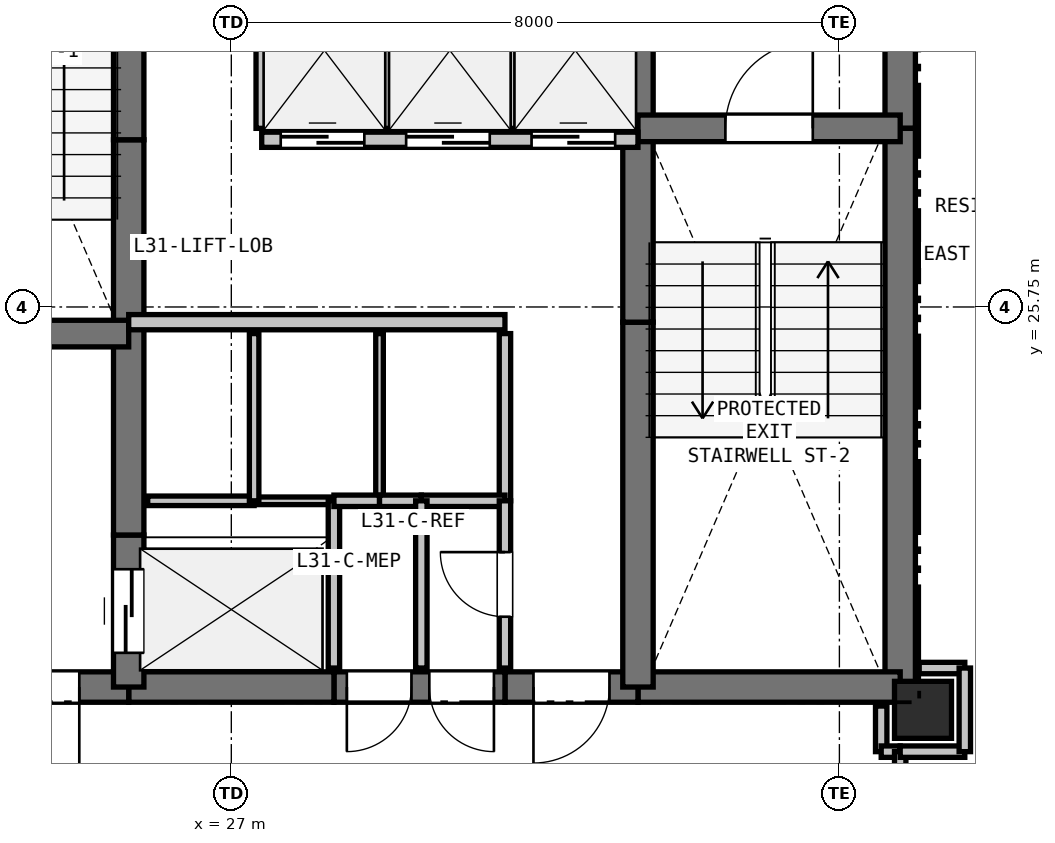
"""IFC4 building model, lengths in metres.
Left out: names, types, materials, properties, quantities, classifications, styles, units other than length and angle.
Written with IfcOpenShell. Run it as: python <this file> out.ifc"""

import sys

from ifc_helpers import new_model, si_unit, direction, frame, frame_2d, origin, origin_2d, place, context, subcontext, project, spatial, rectangle, extrude, element, fill, save


model = new_model("IFC4")
c1 = context("Model", 3, precision=1e-05, world=origin(), true_north=direction((0.0, 1.0)))
c2 = subcontext(c1, "Body", "Model", "MODEL_VIEW")
j1 = project(units=[si_unit("LENGTHUNIT", "METRE"), si_unit("PLANEANGLEUNIT", "RADIAN")], contexts=[c1])
p1 = place(None, origin())
s1 = spatial("IfcSite", under=j1, at=p1, CompositionType="ELEMENT")
p2 = place(p1, origin())
s2 = spatial("IfcBuilding", under=s1, at=p2, CompositionType="ELEMENT")
p3 = place(p2, frame((0.0, 0.0, 113.1)))
s3 = spatial("IfcBuildingStorey", under=s2, at=p3, CompositionType="ELEMENT", Elevation=113.1)
p4 = place(p3, frame((36.1, 20.45, 0.0), z_axis=(0.0, 0.0, 1.0), x_axis=(1.0, 0.0, 0.0)))
e1 = element("IfcColumn", 1, at=p4, inside=s3, PredefinedType="COLUMN", context=c2, shape_type="SweptSolid", body=[
    extrude(rectangle(XDim=0.75, YDim=0.75, at=origin_2d()), origin(), (0.0, 0.0, 1.0), 3.3),
])
p5 = place(p3, frame((35.8, 32.75, 0.0), z_axis=(0.0, 0.0, 1.0), x_axis=(0.0, -1.0, 0.0)))
e2 = element("IfcWall", 2, at=p5, inside=s3, PredefinedType="SHEAR", context=c2, shape_type="SweptSolid", body=[
    extrude(rectangle(XDim=4.65, YDim=0.4, at=frame_2d((2.325, 0.0))), origin(), (0.0, 0.0, 1.0), 3.02),
])
p6 = place(p3, frame((35.8, 28.1, 0.0), z_axis=(0.0, 0.0, 1.0), x_axis=(0.0, -1.0, 0.0)))
e3 = element("IfcWall", 3, at=p6, inside=s3, PredefinedType="SHEAR", context=c2, shape_type="SweptSolid", body=[
    extrude(rectangle(XDim=7.35, YDim=0.4, at=frame_2d((3.675, 0.0))), origin(), (0.0, 0.0, 1.0), 3.02),
])
p7 = place(p3, frame((35.8, 20.75, 0.0), z_axis=(0.0, 0.0, 1.0), x_axis=(-1.0, 0.0, 0.0)))
e4 = element("IfcWall", 4, at=p7, inside=s3, PredefinedType="SHEAR", context=c2, shape_type="SweptSolid", body=[
    extrude(rectangle(XDim=3.45, YDim=0.4, at=frame_2d((1.725, 0.0))), origin(), (0.0, 0.0, 1.0), 3.02),
])
p8 = place(p3, frame((32.35, 20.75, 0.0), z_axis=(0.0, 0.0, 1.0), x_axis=(-1.0, 0.0, 0.0)))
e5 = element("IfcWall", 5, at=p8, inside=s3, PredefinedType="SHEAR", context=c2, shape_type="SweptSolid", body=[
    extrude(rectangle(XDim=1.75, YDim=0.4, at=frame_2d((0.875, 0.0))), origin(), (0.0, 0.0, 1.0), 3.02),
])
p9 = place(p8, frame((0.375, 0.0, 0.0)))
e6 = element("IfcOpeningElement", 6, at=p9, cuts=e5, PredefinedType="OPENING", context=c2, shape_type="SweptSolid", body=[
    extrude(rectangle(XDim=1.0, YDim=2.15, at=frame_2d((0.5, 1.075))), frame((0.0, 0.21, 0.0), z_axis=(0.0, -1.0, 0.0), x_axis=(1.0, 0.0, 0.0)), (0.0, 0.0, 1.0), 0.42),
])
p10 = place(p3, frame((30.6, 20.75, 0.0), z_axis=(0.0, 0.0, 1.0), x_axis=(-1.0, 0.0, 0.0)))
e7 = element("IfcWall", 7, at=p10, inside=s3, PredefinedType="SHEAR", context=c2, shape_type="SweptSolid", body=[
    extrude(rectangle(XDim=2.25, YDim=0.4, at=frame_2d((1.125, 0.0))), origin(), (0.0, 0.0, 1.0), 3.02),
])
p11 = place(p10, frame((1.23, 0.0, 0.0)))
e8 = element("IfcOpeningElement", 8, at=p11, cuts=e7, PredefinedType="OPENING", context=c2, shape_type="SweptSolid", body=[
    extrude(rectangle(XDim=0.85, YDim=2.1, at=frame_2d((0.425, 1.05))), frame((0.0, 0.21, 0.0), z_axis=(0.0, -1.0, 0.0), x_axis=(1.0, 0.0, 0.0)), (0.0, 0.0, 1.0), 0.42),
])
p12 = place(p10, frame((0.145, 0.0, 0.0)))
e9 = element("IfcOpeningElement", 9, at=p12, cuts=e7, PredefinedType="OPENING", context=c2, shape_type="SweptSolid", body=[
    extrude(rectangle(XDim=0.85, YDim=2.1, at=frame_2d((0.425, 1.05))), frame((0.0, 0.21, 0.0), z_axis=(0.0, -1.0, 0.0), x_axis=(1.0, 0.0, 0.0)), (0.0, 0.0, 1.0), 0.42),
])
p13 = place(p3, frame((28.35, 20.75, 0.0), z_axis=(0.0, 0.0, 1.0), x_axis=(-1.0, 0.0, 0.0)))
e10 = element("IfcWall", 10, at=p13, inside=s3, PredefinedType="SHEAR", context=c2, shape_type="SweptSolid", body=[
    extrude(rectangle(XDim=2.7, YDim=0.4, at=frame_2d((1.35, 0.0))), origin(), (0.0, 0.0, 1.0), 3.02),
])
p14 = place(p3, frame((25.65, 20.75, 0.0), z_axis=(0.0, 0.0, 1.0), x_axis=(-1.0, 0.0, 0.0)))
e11 = element("IfcWall", 11, at=p14, inside=s3, PredefinedType="SHEAR", context=c2, shape_type="SweptSolid", body=[
    extrude(rectangle(XDim=3.45, YDim=0.4, at=frame_2d((1.725, 0.0))), origin(), (0.0, 0.0, 1.0), 3.02),
])
p15 = place(p14, frame((0.65, 0.0, 0.0)))
e12 = element("IfcOpeningElement", 12, at=p15, cuts=e11, PredefinedType="OPENING", context=c2, shape_type="SweptSolid", body=[
    extrude(rectangle(XDim=1.15, YDim=2.15, at=frame_2d((0.575, 1.075))), frame((0.0, 0.21, 0.0), z_axis=(0.0, -1.0, 0.0), x_axis=(1.0, 0.0, 0.0)), (0.0, 0.0, 1.0), 0.42),
])
p16 = place(p3, frame((25.65, 20.75, 0.0), z_axis=(0.0, 0.0, 1.0), x_axis=(0.0, 1.0, 0.0)))
e13 = element("IfcWall", 13, at=p16, inside=s3, PredefinedType="SHEAR", context=c2, shape_type="SweptSolid", body=[
    extrude(rectangle(XDim=2.0, YDim=0.4, at=frame_2d((1.0, 0.0))), origin(), (0.0, 0.0, 1.0), 3.02),
])
p17 = place(p16, frame((0.45, 0.0, 0.0)))
e14 = element("IfcOpeningElement", 14, at=p17, cuts=e13, PredefinedType="OPENING", context=c2, shape_type="SweptSolid", body=[
    extrude(rectangle(XDim=1.1, YDim=2.15, at=frame_2d((0.55, 1.075))), frame((0.0, 0.21, 0.0), z_axis=(0.0, -1.0, 0.0), x_axis=(1.0, 0.0, 0.0)), (0.0, 0.0, 1.0), 0.42),
])
p18 = place(p3, frame((25.65, 22.75, 0.0), z_axis=(0.0, 0.0, 1.0), x_axis=(0.0, 1.0, 0.0)))
e15 = element("IfcWall", 15, at=p18, inside=s3, PredefinedType="SHEAR", context=c2, shape_type="SweptSolid", body=[
    extrude(rectangle(XDim=2.8, YDim=0.4, at=frame_2d((1.4, 0.0))), origin(), (0.0, 0.0, 1.0), 3.02),
])
p19 = place(p3, frame((25.65, 25.55, 0.0), z_axis=(0.0, 0.0, 1.0), x_axis=(0.0, 1.0, 0.0)))
e16 = element("IfcWall", 16, at=p19, inside=s3, PredefinedType="SHEAR", context=c2, shape_type="SweptSolid", body=[
    extrude(rectangle(XDim=2.4, YDim=0.4, at=frame_2d((1.2, 0.0))), origin(), (0.0, 0.0, 1.0), 3.02),
])
for number, where, z_axis, x_axis in (
    (17, (25.65, 27.95, 0.0), (0.0, 0.0, 1.0), (0.0, 1.0, 0.0)),
    (18, (32.35, 20.75, 0.0), (0.0, 0.0, 1.0), (0.0, 1.0, 0.0)),
):
    element("IfcWall", number, at=place(p3, frame(where, z_axis=z_axis, x_axis=x_axis)), inside=s3, PredefinedType="SHEAR", context=c2, shape_type="SweptSolid", body=[
        extrude(rectangle(XDim=4.8, YDim=0.4, at=frame_2d((2.4, 0.0))), origin(), (0.0, 0.0, 1.0), 3.02),
    ])
p20 = place(p3, frame((32.35, 25.55, 0.0), z_axis=(0.0, 0.0, 1.0), x_axis=(0.0, 1.0, 0.0)))
e19 = element("IfcWall", 19, at=p20, inside=s3, PredefinedType="SHEAR", context=c2, shape_type="SweptSolid", body=[
    extrude(rectangle(XDim=2.4, YDim=0.4, at=frame_2d((1.2, 0.0))), origin(), (0.0, 0.0, 1.0), 3.02),
])
p21 = place(p3, frame((32.35, 27.95, 0.0), z_axis=(0.0, 0.0, 1.0), x_axis=(0.0, 1.0, 0.0)))
e20 = element("IfcWall", 20, at=p21, inside=s3, PredefinedType="SHEAR", context=c2, shape_type="SweptSolid", body=[
    extrude(rectangle(XDim=2.8, YDim=0.4, at=frame_2d((1.4, 0.0))), origin(), (0.0, 0.0, 1.0), 3.02),
])
p22 = place(p3, frame((22.2, 25.4, 0.0), z_axis=(0.0, 0.0, 1.0), x_axis=(1.0, 0.0, 0.0)))
e21 = element("IfcWall", 21, at=p22, inside=s3, PredefinedType="SHEAR", context=c2, shape_type="SweptSolid", body=[
    extrude(rectangle(XDim=3.45, YDim=0.35, at=frame_2d((1.725, 0.0))), origin(), (0.0, 0.0, 1.0), 3.02),
])
p23 = place(p22, frame((1.15, 0.0, 0.0)))
e22 = element("IfcOpeningElement", 22, at=p23, cuts=e21, PredefinedType="OPENING", context=c2, shape_type="SweptSolid", body=[
    extrude(rectangle(XDim=1.15, YDim=2.15, at=frame_2d((0.575, 1.075))), frame((0.0, 0.185, 0.0), z_axis=(0.0, -1.0, 0.0), x_axis=(1.0, 0.0, 0.0)), (0.0, 0.0, 1.0), 0.37),
])
p24 = place(p3, frame((32.35, 28.1, 0.0), z_axis=(0.0, 0.0, 1.0), x_axis=(1.0, 0.0, 0.0)))
e23 = element("IfcWall", 23, at=p24, inside=s3, PredefinedType="SHEAR", context=c2, shape_type="SweptSolid", body=[
    extrude(rectangle(XDim=3.45, YDim=0.35, at=frame_2d((1.725, 0.0))), origin(), (0.0, 0.0, 1.0), 3.02),
])
p25 = place(p24, frame((1.15, 0.0, 0.0)))
e24 = element("IfcOpeningElement", 24, at=p25, cuts=e23, PredefinedType="OPENING", context=c2, shape_type="SweptSolid", body=[
    extrude(rectangle(XDim=1.15, YDim=2.15, at=frame_2d((0.575, 1.075))), frame((0.0, 0.185, 0.0), z_axis=(0.0, -1.0, 0.0), x_axis=(1.0, 0.0, 0.0)), (0.0, 0.0, 1.0), 0.37),
])
p26 = place(p3, frame((25.65, 25.55, 0.0), z_axis=(0.0, 0.0, 1.0), x_axis=(1.0, 0.0, 0.0)))
e25 = element("IfcWall", 25, at=p26, inside=s3, PredefinedType="PARTITIONING", context=c2, shape_type="SweptSolid", body=[
    extrude(rectangle(XDim=4.95, YDim=0.2, at=frame_2d((2.475, 0.0))), origin(), (0.0, 0.0, 1.0), 3.02),
])
p27 = place(p3, frame((27.4, 27.95, 0.0), z_axis=(0.0, 0.0, 1.0), x_axis=(1.0, 0.0, 0.0)))
e26 = element("IfcWall", 26, at=p27, inside=s3, PredefinedType="PARTITIONING", context=c2, shape_type="SweptSolid", body=[
    extrude(rectangle(XDim=4.95, YDim=0.2, at=frame_2d((2.475, 0.0))), origin(), (0.0, 0.0, 1.0), 3.02),
])
p28 = place(p27, frame((0.25, 0.0, 0.0)))
e27 = element("IfcOpeningElement", 27, at=p28, cuts=e26, PredefinedType="OPENING", context=c2, shape_type="SweptSolid", body=[
    extrude(rectangle(XDim=1.1, YDim=2.15, at=frame_2d((0.55, 1.075))), frame((0.0, 0.11, 0.0), z_axis=(0.0, -1.0, 0.0), x_axis=(1.0, 0.0, 0.0)), (0.0, 0.0, 1.0), 0.22),
])
p29 = place(p27, frame((1.9, 0.0, 0.0)))
e28 = element("IfcOpeningElement", 28, at=p29, cuts=e26, PredefinedType="OPENING", context=c2, shape_type="SweptSolid", body=[
    extrude(rectangle(XDim=1.1, YDim=2.15, at=frame_2d((0.55, 1.075))), frame((0.0, 0.11, 0.0), z_axis=(0.0, -1.0, 0.0), x_axis=(1.0, 0.0, 0.0)), (0.0, 0.0, 1.0), 0.22),
])
p30 = place(p27, frame((3.55, 0.0, 0.0)))
e29 = element("IfcOpeningElement", 29, at=p30, cuts=e26, PredefinedType="OPENING", context=c2, shape_type="SweptSolid", body=[
    extrude(rectangle(XDim=1.1, YDim=2.15, at=frame_2d((0.55, 1.075))), frame((0.0, 0.11, 0.0), z_axis=(0.0, -1.0, 0.0), x_axis=(1.0, 0.0, 0.0)), (0.0, 0.0, 1.0), 0.22),
])
p31 = place(p3, frame((25.9, 23.2, 0.0), z_axis=(0.0, 0.0, 1.0), x_axis=(1.0, 0.0, 0.0)))
e30 = element("IfcWall", 30, at=p31, inside=s3, PredefinedType="PARTITIONING", context=c2, shape_type="SweptSolid", body=[
    extrude(rectangle(XDim=1.4, YDim=0.125, at=frame_2d((0.7, 0.0))), origin(), (0.0, 0.0, 1.0), 3.02),
])
p32 = place(p3, frame((27.3, 23.2, 0.0), z_axis=(0.0, 0.0, 1.0), x_axis=(1.0, 0.0, 0.0)))
e31 = element("IfcWall", 31, at=p32, inside=s3, PredefinedType="PARTITIONING", context=c2, shape_type="SweptSolid", body=[
    extrude(rectangle(XDim=1.05, YDim=0.1, at=frame_2d((0.525, 0.0))), origin(), (0.0, 0.0, 1.0), 3.02),
])
p33 = place(p3, frame((28.35, 23.2, 0.0), z_axis=(0.0, 0.0, 1.0), x_axis=(0.0, -1.0, 0.0)))
e32 = element("IfcWall", 32, at=p33, inside=s3, PredefinedType="PARTITIONING", context=c2, shape_type="SweptSolid", body=[
    extrude(rectangle(XDim=2.2, YDim=0.15, at=frame_2d((1.1, 0.0))), origin(), (0.0, 0.0, 1.0), 3.02),
])
p34 = place(p3, frame((27.3, 25.4, 0.0), z_axis=(0.0, 0.0, 1.0), x_axis=(0.0, -1.0, 0.0)))
e33 = element("IfcWall", 33, at=p34, inside=s3, PredefinedType="PARTITIONING", context=c2, shape_type="SweptSolid", body=[
    extrude(rectangle(XDim=2.2, YDim=0.125, at=frame_2d((1.1, 0.0))), origin(), (0.0, 0.0, 1.0), 3.02),
])
p35 = place(p3, frame((28.95, 25.4, 0.0), z_axis=(0.0, 0.0, 1.0), x_axis=(0.0, -1.0, 0.0)))
e34 = element("IfcWall", 34, at=p35, inside=s3, PredefinedType="PARTITIONING", context=c2, shape_type="SweptSolid", body=[
    extrude(rectangle(XDim=2.2, YDim=0.1, at=frame_2d((1.1, 0.0))), origin(), (0.0, 0.0, 1.0), 3.02),
])
p36 = place(p3, frame((28.95, 23.2, 0.0), z_axis=(0.0, 0.0, 1.0), x_axis=(-1.0, 0.0, 0.0)))
e35 = element("IfcWall", 35, at=p36, inside=s3, PredefinedType="PARTITIONING", context=c2, shape_type="SweptSolid", body=[
    extrude(rectangle(XDim=0.6, YDim=0.15, at=frame_2d((0.3, 0.0))), origin(), (0.0, 0.0, 1.0), 3.02),
])
p37 = place(p3, frame((30.6, 25.4, 0.0), z_axis=(0.0, 0.0, 1.0), x_axis=(0.0, -1.0, 0.0)))
e36 = element("IfcWall", 36, at=p37, inside=s3, PredefinedType="PARTITIONING", context=c2, shape_type="SweptSolid", body=[
    extrude(rectangle(XDim=2.2, YDim=0.15, at=frame_2d((1.1, 0.0))), origin(), (0.0, 0.0, 1.0), 3.02),
])
p38 = place(p3, frame((30.6, 23.2, 0.0), z_axis=(0.0, 0.0, 1.0), x_axis=(-1.0, 0.0, 0.0)))
e37 = element("IfcWall", 37, at=p38, inside=s3, PredefinedType="PARTITIONING", context=c2, shape_type="SweptSolid", body=[
    extrude(rectangle(XDim=1.1, YDim=0.15, at=frame_2d((0.55, 0.0))), origin(), (0.0, 0.0, 1.0), 3.02),
])
p39 = place(p3, frame((29.5, 23.2, 0.0), z_axis=(0.0, 0.0, 1.0), x_axis=(-1.0, 0.0, 0.0)))
e38 = element("IfcWall", 38, at=p39, inside=s3, PredefinedType="PARTITIONING", context=c2, shape_type="SweptSolid", body=[
    extrude(rectangle(XDim=0.55, YDim=0.15, at=frame_2d((0.275, 0.0))), origin(), (0.0, 0.0, 1.0), 3.02),
])
p40 = place(p3, frame((29.05, 30.3, 0.0), z_axis=(0.0, 0.0, 1.0), x_axis=(0.0, -1.0, 0.0)))
e39 = element("IfcWall", 39, at=p40, inside=s3, PredefinedType="PARTITIONING", context=c2, shape_type="SweptSolid", body=[
    extrude(rectangle(XDim=2.2, YDim=0.125, at=frame_2d((1.1, 0.0))), origin(), (0.0, 0.0, 1.0), 3.02),
])
p41 = place(p3, frame((27.4, 28.1, 0.0), z_axis=(0.0, 0.0, 1.0), x_axis=(0.0, 1.0, 0.0)))
e40 = element("IfcWall", 40, at=p41, inside=s3, PredefinedType="PARTITIONING", context=c2, shape_type="SweptSolid", body=[
    extrude(rectangle(XDim=2.2, YDim=0.15, at=frame_2d((1.1, 0.0))), origin(), (0.0, 0.0, 1.0), 3.02),
])
p42 = place(p3, frame((30.7, 30.3, 0.0), z_axis=(0.0, 0.0, 1.0), x_axis=(0.0, -1.0, 0.0)))
e41 = element("IfcWall", 41, at=p42, inside=s3, PredefinedType="PARTITIONING", context=c2, shape_type="SweptSolid", body=[
    extrude(rectangle(XDim=2.2, YDim=0.1, at=frame_2d((1.1, 0.0))), origin(), (0.0, 0.0, 1.0), 3.02),
])
p43 = place(p3, frame((30.6, 21.0, 0.0), z_axis=(0.0, 0.0, 1.0), x_axis=(0.0, 1.0, 0.0)))
e42 = element("IfcWall", 42, at=p43, inside=s3, PredefinedType="PARTITIONING", context=c2, shape_type="SweptSolid", body=[
    extrude(rectangle(XDim=2.2, YDim=0.15, at=frame_2d((1.1, 0.0))), origin(), (0.0, 0.0, 1.0), 3.02),
])
p44 = place(p43, frame((0.675, 0.0, 0.0)))
e43 = element("IfcOpeningElement", 43, at=p44, cuts=e42, PredefinedType="OPENING", context=c2, shape_type="SweptSolid", body=[
    extrude(rectangle(XDim=0.85, YDim=2.1, at=frame_2d((0.425, 1.05))), frame((0.0, 0.085, 0.0), z_axis=(0.0, -1.0, 0.0), x_axis=(1.0, 0.0, 0.0)), (0.0, 0.0, 1.0), 0.17),
])
p45 = place(p3, frame((35.55, 20.5, 0.0), z_axis=(0.0, 0.0, 1.0), x_axis=(0.0, -1.0, 0.0)))
e44 = element("IfcWall", 44, at=p45, inside=s3, PredefinedType="PARTITIONING", context=c2, shape_type="SweptSolid", body=[
    extrude(rectangle(XDim=0.6, YDim=0.15, at=frame_2d((0.3, 0.0))), origin(), (0.0, 0.0, 1.0), 2.468),
])
p46 = place(p3, frame((35.55, 19.9, 0.0), z_axis=(0.0, 0.0, 1.0), x_axis=(1.0, 0.0, 0.0)))
e45 = element("IfcWall", 45, at=p46, inside=s3, PredefinedType="PARTITIONING", context=c2, shape_type="SweptSolid", body=[
    extrude(rectangle(XDim=0.25, YDim=0.15, at=frame_2d((0.125, 0.0))), origin(), (0.0, 0.0, 1.0), 3.02),
])
p47 = place(p3, frame((35.8, 19.9, 0.0), z_axis=(0.0, 0.0, 1.0), x_axis=(0.0, -1.0, 0.0)))
e46 = element("IfcWall", 46, at=p47, inside=s3, PredefinedType="PARTITIONING", context=c2, shape_type="SweptSolid", body=[
    extrude(rectangle(XDim=1.75, YDim=0.15, at=frame_2d((0.875, 0.0))), origin(), (0.0, 0.0, 1.0), 3.02),
])
p48 = place(p47, frame((0.375, 0.0, 0.0)))
e47 = element("IfcOpeningElement", 47, at=p48, cuts=e46, PredefinedType="OPENING", context=c2, shape_type="SweptSolid", body=[
    extrude(rectangle(XDim=1.0, YDim=2.15, at=frame_2d((0.5, 1.075))), frame((0.0, 0.085, 0.0), z_axis=(0.0, -1.0, 0.0), x_axis=(1.0, 0.0, 0.0)), (0.0, 0.0, 1.0), 0.17),
])
p49 = place(p3, frame((36.65, 21.0, 0.0), z_axis=(0.0, 0.0, 1.0), x_axis=(-1.0, 0.0, 0.0)))
e48 = element("IfcWall", 48, at=p49, inside=s3, PredefinedType="PARTITIONING", context=c2, shape_type="SweptSolid", body=[
    extrude(rectangle(XDim=0.6, YDim=0.15, at=frame_2d((0.3, 0.0))), origin(), (0.0, 0.0, 1.0), 2.468),
])
p50 = place(p3, frame((35.8, 19.9, 0.0), z_axis=(0.0, 0.0, 1.0), x_axis=(1.0, 0.0, 0.0)))
e49 = element("IfcWall", 49, at=p50, inside=s3, PredefinedType="PARTITIONING", context=c2, shape_type="SweptSolid", body=[
    extrude(rectangle(XDim=0.85, YDim=0.15, at=frame_2d((0.425, 0.0))), origin(), (0.0, 0.0, 1.0), 2.393),
])
p51 = place(p3, frame((36.65, 19.9, 0.0), z_axis=(0.0, 0.0, 1.0), x_axis=(0.0, 1.0, 0.0)))
e50 = element("IfcWall", 50, at=p51, inside=s3, PredefinedType="PARTITIONING", context=c2, shape_type="SweptSolid", body=[
    extrude(rectangle(XDim=1.1, YDim=0.15, at=frame_2d((0.55, 0.0))), origin(), (0.0, 0.0, 1.0), 3.02),
])
p52 = place(p3, frame((29.5, 23.2, 0.0), z_axis=(0.0, 0.0, 1.0), x_axis=(0.0, -1.0, 0.0)))
e51 = element("IfcWall", 51, at=p52, inside=s3, PredefinedType="PARTITIONING", context=c2, shape_type="SweptSolid", body=[
    extrude(rectangle(XDim=2.2, YDim=0.15, at=frame_2d((1.1, 0.0))), origin(), (0.0, 0.0, 1.0), 3.02),
])
p53 = place(p28, origin())
e52 = element("IfcDoor", 52, at=p53, inside=s3, OperationType="SLIDING_TO_LEFT", PredefinedType="DOOR", context=c2, shape_type="SweptSolid", body=[
    extrude(rectangle(XDim=1.1, YDim=2.15, at=frame_2d((0.55, 1.075))), frame((0.0, 0.025, 0.0), z_axis=(0.0, -1.0, 0.0), x_axis=(1.0, 0.0, 0.0)), (0.0, 0.0, 1.0), 0.05),
])
fill(e27, e52)
p54 = place(p29, origin())
e53 = element("IfcDoor", 53, at=p54, inside=s3, OperationType="SLIDING_TO_LEFT", PredefinedType="DOOR", context=c2, shape_type="SweptSolid", body=[
    extrude(rectangle(XDim=1.1, YDim=2.15, at=frame_2d((0.55, 1.075))), frame((0.0, 0.025, 0.0), z_axis=(0.0, -1.0, 0.0), x_axis=(1.0, 0.0, 0.0)), (0.0, 0.0, 1.0), 0.05),
])
fill(e28, e53)
p55 = place(p30, origin())
e54 = element("IfcDoor", 54, at=p55, inside=s3, OperationType="SLIDING_TO_LEFT", PredefinedType="DOOR", context=c2, shape_type="SweptSolid", body=[
    extrude(rectangle(XDim=1.1, YDim=2.15, at=frame_2d((0.55, 1.075))), frame((0.0, 0.025, 0.0), z_axis=(0.0, -1.0, 0.0), x_axis=(1.0, 0.0, 0.0)), (0.0, 0.0, 1.0), 0.05),
])
fill(e29, e54)
p56 = place(p9, origin())
e55 = element("IfcDoor", 55, at=p56, inside=s3, OperationType="SINGLE_SWING_RIGHT", PredefinedType="DOOR", context=c2, shape_type="SweptSolid", body=[
    extrude(rectangle(XDim=1.0, YDim=2.15, at=frame_2d((0.5, 1.075))), frame((0.0, 0.025, 0.0), z_axis=(0.0, -1.0, 0.0), x_axis=(1.0, 0.0, 0.0)), (0.0, 0.0, 1.0), 0.05),
])
fill(e6, e55)
p57 = place(p17, origin())
e56 = element("IfcDoor", 56, at=p57, inside=s3, OperationType="SLIDING_TO_LEFT", PredefinedType="DOOR", context=c2, shape_type="SweptSolid", body=[
    extrude(rectangle(XDim=1.1, YDim=2.15, at=frame_2d((0.55, 1.075))), frame((0.0, 0.025, 0.0), z_axis=(0.0, -1.0, 0.0), x_axis=(1.0, 0.0, 0.0)), (0.0, 0.0, 1.0), 0.05),
])
fill(e14, e56)
p58 = place(p25, origin())
e57 = element("IfcDoor", 57, at=p58, inside=s3, OperationType="SINGLE_SWING_RIGHT", PredefinedType="DOOR", context=c2, shape_type="SweptSolid", body=[
    extrude(rectangle(XDim=1.15, YDim=2.15, at=frame_2d((0.575, 1.075))), frame((0.0, 0.025, 0.0), z_axis=(0.0, -1.0, 0.0), x_axis=(1.0, 0.0, 0.0)), (0.0, 0.0, 1.0), 0.05),
])
fill(e24, e57)
p59 = place(p15, origin())
e58 = element("IfcDoor", 58, at=p59, inside=s3, OperationType="SINGLE_SWING_LEFT", PredefinedType="DOOR", context=c2, shape_type="SweptSolid", body=[
    extrude(rectangle(XDim=1.15, YDim=2.15, at=frame_2d((0.575, 1.075))), frame((0.0, 0.025, 0.0), z_axis=(0.0, -1.0, 0.0), x_axis=(1.0, 0.0, 0.0)), (0.0, 0.0, 1.0), 0.05),
])
fill(e12, e58)
p60 = place(p44, origin())
e59 = element("IfcDoor", 59, at=p60, inside=s3, OperationType="SINGLE_SWING_RIGHT", PredefinedType="DOOR", context=c2, shape_type="SweptSolid", body=[
    extrude(rectangle(XDim=0.85, YDim=2.1, at=frame_2d((0.425, 1.05))), frame((0.0, 0.025, 0.0), z_axis=(0.0, -1.0, 0.0), x_axis=(1.0, 0.0, 0.0)), (0.0, 0.0, 1.0), 0.05),
])
fill(e43, e59)
p61 = place(p11, origin())
e60 = element("IfcDoor", 60, at=p61, inside=s3, OperationType="SINGLE_SWING_RIGHT", PredefinedType="DOOR", context=c2, shape_type="SweptSolid", body=[
    extrude(rectangle(XDim=0.85, YDim=2.1, at=frame_2d((0.425, 1.05))), frame((0.0, 0.025, 0.0), z_axis=(0.0, -1.0, 0.0), x_axis=(1.0, 0.0, 0.0)), (0.0, 0.0, 1.0), 0.05),
])
fill(e8, e60)
p62 = place(p12, origin())
e61 = element("IfcDoor", 61, at=p62, inside=s3, OperationType="SINGLE_SWING_LEFT", PredefinedType="DOOR", context=c2, shape_type="SweptSolid", body=[
    extrude(rectangle(XDim=0.85, YDim=2.1, at=frame_2d((0.425, 1.05))), frame((0.0, 0.025, 0.0), z_axis=(0.0, -1.0, 0.0), x_axis=(1.0, 0.0, 0.0)), (0.0, 0.0, 1.0), 0.05),
])
fill(e9, e61)
save(model, sys.argv[1])
